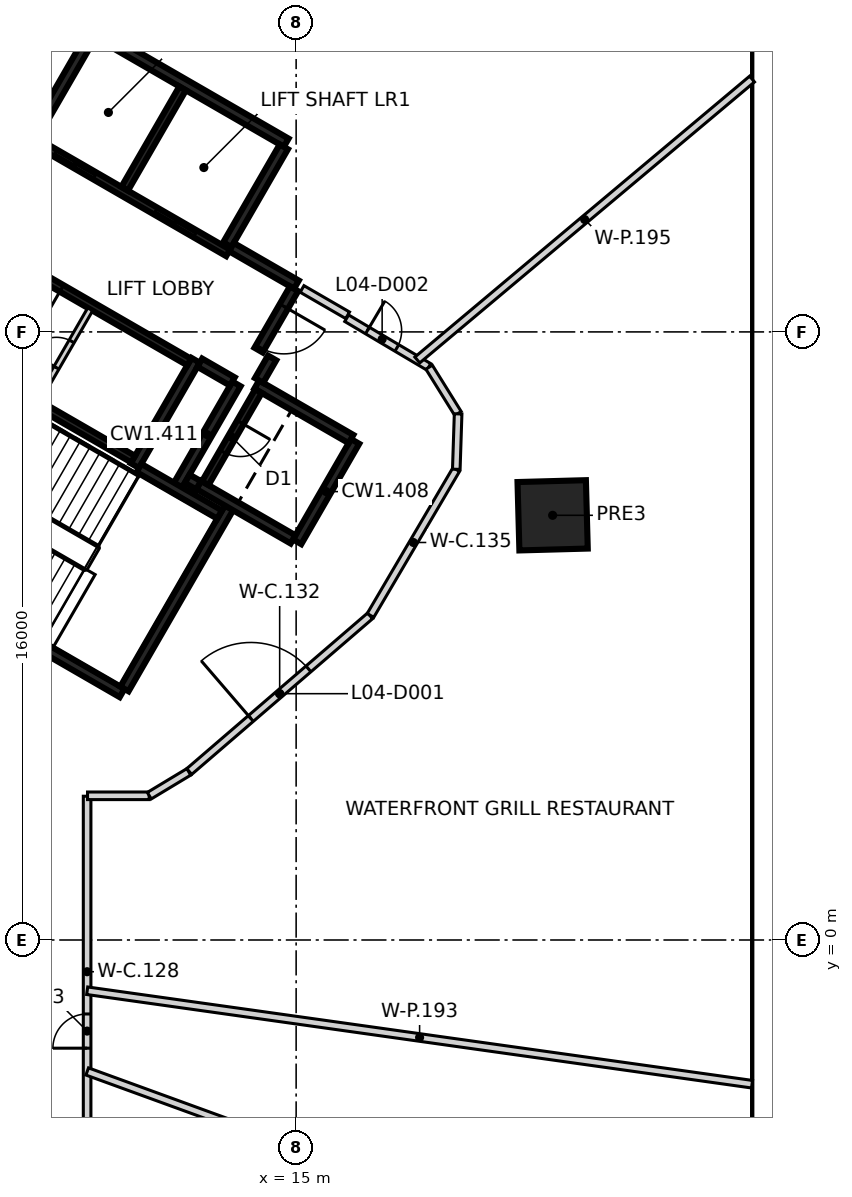
"""IFC4 building model, lengths in metres.
Left out: names, types, materials, properties, quantities, classifications, styles, units other than length and angle.
Written with IfcOpenShell. Run it as: python <this file> out.ifc"""

import sys

from ifc_helpers import new_model, si_unit, direction, frame, frame_2d, origin, origin_2d, place, context, subcontext, project, spatial, rectangle, extrude, element, fill, save


model = new_model("IFC4")
c1 = context("Model", 3, precision=1e-05, world=origin(), true_north=direction((0.0, 1.0)))
c2 = subcontext(c1, "Body", "Model", "MODEL_VIEW")
j1 = project(units=[si_unit("LENGTHUNIT", "METRE"), si_unit("PLANEANGLEUNIT", "RADIAN")], contexts=[c1])
p1 = place(None, origin())
s1 = spatial("IfcSite", under=j1, at=p1, CompositionType="ELEMENT")
p2 = place(p1, origin())
s2 = spatial("IfcBuilding", under=s1, at=p2, CompositionType="ELEMENT")
p3 = place(p2, frame((0.0, 0.0, 24.5)))
s3 = spatial("IfcBuildingStorey", under=s2, at=p3, CompositionType="ELEMENT", Elevation=24.5)
p4 = place(p3, frame((21.749, 11.174, -0.45), z_axis=(0.0, 0.0, 1.0), x_axis=(0.999628128016, 0.02726913418, 0.0)))
e1 = element("IfcColumn", 1, at=p4, inside=s3, PredefinedType="COLUMN", context=c2, shape_type="SweptSolid", body=[
    extrude(rectangle(XDim=1.8, YDim=1.8, at=origin_2d()), origin(), (0.0, 0.0, 1.0), 5.05),
])
p5 = place(p3, frame((10.42, 6.498, 0.0), z_axis=(0.0, 0.0, 1.0), x_axis=(-0.866021906294, 0.500006057782, 0.0)))
e2 = element("IfcWall", 2, at=p5, inside=s3, PredefinedType="SHEAR", context=c2, shape_type="SweptSolid", body=[
    extrude(rectangle(XDim=11.55, YDim=0.25, at=frame_2d((5.775, 0.0))), origin(), (0.0, 0.0, 1.0), 4.6),
])
p6 = place(p5, frame((10.025, 0.0, 0.0)))
e3 = element("IfcOpeningElement", 3, at=p6, cuts=e2, PredefinedType="OPENING", context=c2, shape_type="SweptSolid", body=[
    extrude(rectangle(XDim=1.2, YDim=2.1, at=frame_2d((0.6, 1.05))), frame((0.0, 0.135, 0.0), z_axis=(0.0, -1.0, 0.0), x_axis=(1.0, 0.0, 0.0)), (0.0, 0.0, 1.0), 0.27),
])
p7 = place(p5, frame((8.725, 0.0, 0.0)))
e4 = element("IfcOpeningElement", 4, at=p7, cuts=e2, PredefinedType="OPENING", context=c2, shape_type="SweptSolid", body=[
    extrude(rectangle(XDim=1.2, YDim=2.1, at=frame_2d((0.6, 1.05))), frame((0.0, 0.135, 0.0), z_axis=(0.0, -1.0, 0.0), x_axis=(1.0, 0.0, 0.0)), (0.0, 0.0, 1.0), 0.27),
])
p8 = place(p3, frame((9.673, 23.903, 0.0), z_axis=(0.0, 0.0, 1.0), x_axis=(0.86603616409, -0.499981362141, 0.0)))
e5 = element("IfcWall", 5, at=p8, inside=s3, PredefinedType="SHEAR", context=c2, shape_type="SweptSolid", body=[
    extrude(rectangle(XDim=5.85, YDim=0.25, at=frame_2d((2.925, 0.0))), origin(), (0.0, 0.0, 1.0), 4.6),
])
p9 = place(p3, frame((13.238, 11.378, 0.0), z_axis=(0.0, 0.0, 1.0), x_axis=(-0.500008851346, -0.866020293397, 0.0)))
e6 = element("IfcWall", 6, at=p9, inside=s3, PredefinedType="SHEAR", context=c2, shape_type="SweptSolid", body=[
    extrude(rectangle(XDim=5.51, YDim=0.25, at=frame_2d((2.755, 0.0))), origin(), (0.0, 0.0, 1.0), 4.6),
])
p10 = place(p3, frame((12.357, 15.252, 0.0), z_axis=(0.0, 0.0, 1.0), x_axis=(-0.500028443584, -0.866008981251, 0.0)))
e7 = element("IfcWall", 7, at=p10, inside=s3, PredefinedType="SHEAR", context=c2, shape_type="SweptSolid", body=[
    extrude(rectangle(XDim=3.2, YDim=0.25, at=frame_2d((1.6, 0.0))), origin(), (0.0, 0.0, 1.0), 4.6),
])
for number, where, z_axis, x_axis in (
    (8, (8.123, 21.219, 0.0), (0.0, 0.0, 1.0), (0.5, 0.866, 0.0)),
    (9, (14.676, 20.87, 0.0), (0.0, 0.0, 1.0), (-0.5, -0.866, 0.0)),
):
    element("IfcWall", number, at=place(p3, frame(where, z_axis=z_axis, x_axis=x_axis)), inside=s3, PredefinedType="SHEAR", context=c2, shape_type="SweptSolid", body=[
        extrude(rectangle(XDim=2.975, YDim=0.25, at=frame_2d((1.487, 0.0))), origin(), (0.0, 0.0, 1.0), 4.6),
    ])
p11 = place(p3, frame((16.552, 13.119, 0.0), z_axis=(0.0, 0.0, 1.0), x_axis=(-0.499978833458, -0.866037623948, 0.0)))
e10 = element("IfcWall", 10, at=p11, inside=s3, PredefinedType="SHEAR", context=c2, shape_type="SweptSolid", body=[
    extrude(rectangle(XDim=3.05, YDim=0.25, at=frame_2d((1.525, 0.0))), origin(), (0.0, 0.0, 1.0), 4.6),
])
p12 = place(p3, frame((14.918, 10.54, 0.0), z_axis=(0.0, 0.0, 1.0), x_axis=(-0.866063538972, 0.499933942099, 0.0)))
e11 = element("IfcWall", 11, at=p12, inside=s3, PredefinedType="SHEAR", context=c2, shape_type="SweptSolid", body=[
    extrude(rectangle(XDim=2.865, YDim=0.25, at=frame_2d((1.432, 0.0))), origin(), (0.0, 0.0, 1.0), 4.6),
])
p13 = place(p3, frame((13.963, 14.614, 0.0), z_axis=(0.0, 0.0, 1.0), x_axis=(0.866042235819, -0.499970844928, 0.0)))
e12 = element("IfcWall", 12, at=p13, inside=s3, PredefinedType="SHEAR", context=c2, shape_type="SweptSolid", body=[
    extrude(rectangle(XDim=2.865, YDim=0.25, at=frame_2d((1.432, 0.0))), origin(), (0.0, 0.0, 1.0), 4.6),
])
p14 = place(p3, frame((11.888, 11.961, 0.0), z_axis=(0.0, 0.0, 1.0), x_axis=(0.500003324108, 0.866023484601, 0.0)))
e13 = element("IfcWall", 13, at=p14, inside=s3, PredefinedType="SHEAR", context=c2, shape_type="SweptSolid", body=[
    extrude(rectangle(XDim=3.085, YDim=0.25, at=frame_2d((1.542, 0.0))), origin(), (0.0, 0.0, 1.0), 4.6),
])
p15 = place(p3, frame((10.865, 12.418, 0.0), z_axis=(0.0, 0.0, 1.0), x_axis=(0.866026229868, -0.499998569178, 0.0)))
e14 = element("IfcWall", 14, at=p15, inside=s3, PredefinedType="SHEAR", context=c2, shape_type="SweptSolid", body=[
    extrude(rectangle(XDim=2.449, YDim=0.25, at=frame_2d((1.225, 0.0))), origin(), (0.0, 0.0, 1.0), 4.6),
])
p16 = place(p3, frame((13.297, 18.231, 0.0), z_axis=(0.0, 0.0, 1.0), x_axis=(0.866043531843, -0.499968599967, 0.0)))
e15 = element("IfcWall", 15, at=p16, inside=s3, PredefinedType="SHEAR", context=c2, shape_type="SweptSolid", body=[
    extrude(rectangle(XDim=1.975, YDim=0.25, at=frame_2d((0.987, 0.0))), origin(), (0.0, 0.0, 1.0), 4.6),
])
p17 = place(p3, frame((14.945, 17.135, 0.0), z_axis=(0.0, 0.0, 1.0), x_axis=(-0.499983108224, -0.866035156036, 0.0)))
e16 = element("IfcWall", 16, at=p17, inside=s3, PredefinedType="SHEAR", context=c2, shape_type="SweptSolid", body=[
    extrude(rectangle(XDim=1.865, YDim=0.25, at=frame_2d((0.932, 0.0))), origin(), (0.0, 0.0, 1.0), 4.6),
])
p18 = place(p17, frame((0.535, 0.0, 0.0)))
e17 = element("IfcOpeningElement", 17, at=p18, cuts=e16, PredefinedType="OPENING", context=c2, shape_type="SweptSolid", body=[
    extrude(rectangle(XDim=1.25, YDim=2.1, at=frame_2d((0.625, 1.05))), frame((0.0, 0.135, 0.0), z_axis=(0.0, -1.0, 0.0), x_axis=(1.0, 0.0, 0.0)), (0.0, 0.0, 1.0), 0.27),
])
p19 = place(p3, frame((13.322, 14.695, 0.0), z_axis=(0.0, 0.0, 1.0), x_axis=(-0.866017078145, 0.500014420154, 0.0)))
e18 = element("IfcWall", 18, at=p19, inside=s3, PredefinedType="SHEAR", context=c2, shape_type="SweptSolid", body=[
    extrude(rectangle(XDim=0.989, YDim=0.25, at=frame_2d((0.495, 0.0))), origin(), (0.0, 0.0, 1.0), 4.6),
])
p20 = place(p3, frame((14.368, 15.315, 0.0), z_axis=(0.0, 0.0, 1.0), x_axis=(-0.499897359611, -0.866084655132, 0.0)))
e19 = element("IfcWall", 19, at=p20, inside=s3, PredefinedType="SHEAR", context=c2, shape_type="SweptSolid", body=[
    extrude(rectangle(XDim=0.685, YDim=0.25, at=frame_2d((0.342, 0.0))), origin(), (0.0, 0.0, 1.0), 4.6),
])
p21 = place(p3, frame((12.433, 11.964, 0.0), z_axis=(0.0, 0.0, 1.0), x_axis=(-0.866055875208, 0.499947218231, 0.0)))
e20 = element("IfcWall", 20, at=p21, inside=s3, PredefinedType="SHEAR", context=c2, shape_type="SweptSolid", body=[
    extrude(rectangle(XDim=0.345, YDim=0.25, at=frame_2d((0.172, 0.0))), origin(), (0.0, 0.0, 1.0), 4.6),
])
p22 = place(p3, frame((13.21, 18.08, 0.0), z_axis=(0.0, 0.0, 1.0), x_axis=(-0.866030299012, 0.499991521122, 0.0)))
e21 = element("IfcWall", 21, at=p22, inside=s3, PredefinedType="SHEAR", context=c2, shape_type="SweptSolid", body=[
    extrude(rectangle(XDim=6.1, YDim=0.2, at=frame_2d((3.05, 0.0))), origin(), (0.0, 0.0, 1.0), 4.6),
])
p23 = place(p22, frame((1.0, 0.0, 0.0)))
e22 = element("IfcOpeningElement", 22, at=p23, cuts=e21, PredefinedType="OPENING", context=c2, shape_type="SweptSolid", body=[
    extrude(rectangle(XDim=1.2, YDim=2.1, at=frame_2d((0.6, 1.05))), frame((0.0, 0.11, 0.0), z_axis=(0.0, -1.0, 0.0), x_axis=(1.0, 0.0, 0.0)), (0.0, 0.0, 1.0), 0.22),
])
p24 = place(p22, frame((4.05, 0.0, 0.0)))
e23 = element("IfcOpeningElement", 23, at=p24, cuts=e21, PredefinedType="OPENING", context=c2, shape_type="SweptSolid", body=[
    extrude(rectangle(XDim=1.2, YDim=2.1, at=frame_2d((0.6, 1.05))), frame((0.0, 0.11, 0.0), z_axis=(0.0, -1.0, 0.0), x_axis=(1.0, 0.0, 0.0)), (0.0, 0.0, 1.0), 0.22),
])
p25 = place(p3, frame((5.775, 15.502, 0.0), z_axis=(0.0, 0.0, 1.0), x_axis=(0.866020080793, -0.500009219579, 0.0)))
e24 = element("IfcWall", 24, at=p25, inside=s3, PredefinedType="SHEAR", context=c2, shape_type="SweptSolid", body=[
    extrude(rectangle(XDim=5.699, YDim=0.2, at=frame_2d((2.85, 0.0))), origin(), (0.0, 0.0, 1.0), 4.6),
])
p26 = place(p3, frame((12.185, 15.207, 0.0), z_axis=(0.0, 0.0, 1.0), x_axis=(-0.866020080793, 0.500009219579, 0.0)))
e25 = element("IfcWall", 25, at=p26, inside=s3, PredefinedType="SHEAR", context=c2, shape_type="SweptSolid", body=[
    extrude(rectangle(XDim=5.699, YDim=0.2, at=frame_2d((2.85, 0.0))), origin(), (0.0, 0.0, 1.0), 4.6),
])
p27 = place(p26, frame((3.874, 0.0, 0.0)))
e26 = element("IfcOpeningElement", 26, at=p27, cuts=e25, PredefinedType="OPENING", context=c2, shape_type="SweptSolid", body=[
    extrude(rectangle(XDim=0.9, YDim=2.1, at=frame_2d((0.45, 1.05))), frame((0.0, 0.11, 0.0), z_axis=(0.0, -1.0, 0.0), x_axis=(1.0, 0.0, 0.0)), (0.0, 0.0, 1.0), 0.22),
])
p28 = place(p3, frame((10.489, 19.767, 0.0), z_axis=(0.0, 0.0, 1.0), x_axis=(0.499946628782, 0.866056215479, 0.0)))
e27 = element("IfcWall", 27, at=p28, inside=s3, PredefinedType="SHEAR", context=c2, shape_type="SweptSolid", body=[
    extrude(rectangle(XDim=3.048, YDim=0.2, at=frame_2d((1.524, 0.0))), origin(), (0.0, 0.0, 1.0), 4.6),
])
p29 = place(p3, frame((14.008, 14.442, 0.0), z_axis=(0.0, 0.0, 1.0), x_axis=(-0.499986818241, -0.866033014143, 0.0)))
e28 = element("IfcWall", 28, at=p29, inside=s3, PredefinedType="SHEAR", context=c2, shape_type="SweptSolid", body=[
    extrude(rectangle(XDim=2.798, YDim=0.2, at=frame_2d((1.399, 0.0))), origin(), (0.0, 0.0, 1.0), 4.6),
])
p30 = place(p29, frame((0.949, 0.0, 0.0)))
e29 = element("IfcOpeningElement", 29, at=p30, cuts=e28, PredefinedType="OPENING", context=c2, shape_type="SweptSolid", body=[
    extrude(rectangle(XDim=0.9, YDim=2.1, at=frame_2d((0.45, 1.05))), frame((0.0, 0.11, 0.0), z_axis=(0.0, -1.0, 0.0), x_axis=(1.0, 0.0, 0.0)), (0.0, 0.0, 1.0), 0.22),
])
p31 = place(p3, frame((8.207, 14.214, 0.0), z_axis=(0.0, 0.0, 1.0), x_axis=(0.499922376475, 0.866070215109, 0.0)))
e30 = element("IfcWall", 30, at=p31, inside=s3, PredefinedType="PARTITIONING", context=c2, shape_type="SweptSolid", body=[
    extrude(rectangle(XDim=2.749, YDim=0.15, at=frame_2d((1.374, 0.0))), origin(), (0.0, 0.0, 1.0), 4.6),
])
p32 = place(p31, frame((0.974, 0.0, 0.0)))
e31 = element("IfcOpeningElement", 31, at=p32, cuts=e30, PredefinedType="OPENING", context=c2, shape_type="SweptSolid", body=[
    extrude(rectangle(XDim=0.8, YDim=2.1, at=frame_2d((0.4, 1.05))), frame((0.0, 0.085, 0.0), z_axis=(0.0, -1.0, 0.0), x_axis=(1.0, 0.0, 0.0)), (0.0, 0.0, 1.0), 0.17),
])
p33 = place(p3, frame((9.5, -5.453, 0.0), z_axis=(0.0, 0.0, 1.0), x_axis=(0.0, 1.0, 0.0)))
e32 = element("IfcWall", 32, at=p33, inside=s3, PredefinedType="PARTITIONING", context=c2, shape_type="SweptSolid", body=[
    extrude(rectangle(XDim=9.236, YDim=0.2, at=frame_2d((4.618, 0.0))), origin(), (0.0, 0.0, 1.0), 4.6),
])
p34 = place(p33, frame((2.606, 0.0, 0.0)))
e33 = element("IfcOpeningElement", 33, at=p34, cuts=e32, PredefinedType="OPENING", context=c2, shape_type="SweptSolid", body=[
    extrude(rectangle(XDim=0.9, YDim=2.1, at=frame_2d((0.45, 1.05))), frame((0.0, 0.11, 0.0), z_axis=(0.0, -1.0, 0.0), x_axis=(1.0, 0.0, 0.0)), (0.0, 0.0, 1.0), 0.22),
])
p35 = place(p3, frame((9.511, 3.794, 0.0), z_axis=(0.0, 0.0, 1.0), x_axis=(1.0, 0.0, 0.0)))
e34 = element("IfcWall", 34, at=p35, inside=s3, PredefinedType="PARTITIONING", context=c2, shape_type="SweptSolid", body=[
    extrude(rectangle(XDim=1.622, YDim=0.2, at=frame_2d((0.811, 0.0))), origin(), (0.0, 0.0, 1.0), 4.6),
])
p36 = place(p3, frame((11.136, 3.797, 0.0), z_axis=(0.0, 0.0, 1.0), x_axis=(0.856426766029, 0.516268529381, 0.0)))
e35 = element("IfcWall", 35, at=p36, inside=s3, PredefinedType="PARTITIONING", context=c2, shape_type="SweptSolid", body=[
    extrude(rectangle(XDim=1.214, YDim=0.2, at=frame_2d((0.607, 0.0))), origin(), (0.0, 0.0, 1.0), 4.6),
])
p37 = place(p3, frame((12.187, 4.433, 0.0), z_axis=(0.0, 0.0, 1.0), x_axis=(0.757934867899, 0.652330235405, 0.0)))
e36 = element("IfcWall", 36, at=p37, inside=s3, PredefinedType="PARTITIONING", context=c2, shape_type="SweptSolid", body=[
    extrude(rectangle(XDim=6.279, YDim=0.2, at=frame_2d((3.14, 0.0))), origin(), (0.0, 0.0, 1.0), 4.6),
])
p38 = place(p37, frame((2.139, 0.0, 0.0)))
e37 = element("IfcOpeningElement", 37, at=p38, cuts=e36, PredefinedType="OPENING", context=c2, shape_type="SweptSolid", body=[
    extrude(rectangle(XDim=2.0, YDim=2.1, at=frame_2d((1.0, 1.05))), frame((0.0, 0.11, 0.0), z_axis=(0.0, -1.0, 0.0), x_axis=(1.0, 0.0, 0.0)), (0.0, 0.0, 1.0), 0.22),
])
p39 = place(p3, frame((15.156, 17.131, 0.0), z_axis=(0.0, 0.0, 1.0), x_axis=(0.865639364436, -0.500668044455, 0.0)))
e38 = element("IfcWall", 38, at=p39, inside=s3, PredefinedType="PARTITIONING", context=c2, shape_type="SweptSolid", body=[
    extrude(rectangle(XDim=1.385, YDim=0.2, at=frame_2d((0.693, 0.0))), origin(), (0.0, 0.0, 1.0), 4.6),
])
p40 = place(p3, frame((16.33, 16.36, 0.0), z_axis=(0.0, 0.0, 1.0), x_axis=(0.860403612142, -0.5096132104, 0.0)))
e39 = element("IfcWall", 39, at=p40, inside=s3, PredefinedType="PARTITIONING", context=c2, shape_type="SweptSolid", body=[
    extrude(rectangle(XDim=2.512, YDim=0.2, at=frame_2d((1.256, 0.0))), origin(), (0.0, 0.0, 1.0), 4.6),
])
p41 = place(p40, frame((0.635, 0.0, 0.0)))
e40 = element("IfcOpeningElement", 40, at=p41, cuts=e39, PredefinedType="OPENING", context=c2, shape_type="SweptSolid", body=[
    extrude(rectangle(XDim=0.9, YDim=2.1, at=frame_2d((0.45, 1.05))), frame((0.0, 0.11, 0.0), z_axis=(0.0, -1.0, 0.0), x_axis=(1.0, 0.0, 0.0)), (0.0, 0.0, 1.0), 0.22),
])
p42 = place(p3, frame((16.956, 8.54, 0.0), z_axis=(0.0, 0.0, 1.0), x_axis=(0.506799683615, 0.862063849542, 0.0)))
e41 = element("IfcWall", 41, at=p42, inside=s3, PredefinedType="PARTITIONING", context=c2, shape_type="SweptSolid", body=[
    extrude(rectangle(XDim=4.453, YDim=0.2, at=frame_2d((2.227, 0.0))), origin(), (0.0, 0.0, 1.0), 4.6),
])
p43 = place(p3, frame((18.499, 15.072, 0.0), z_axis=(0.0, 0.0, 1.0), x_axis=(0.528576945796, -0.848885394133, 0.0)))
e42 = element("IfcWall", 42, at=p43, inside=s3, PredefinedType="PARTITIONING", context=c2, shape_type="SweptSolid", body=[
    extrude(rectangle(XDim=1.436, YDim=0.2, at=frame_2d((0.718, 0.0))), origin(), (0.0, 0.0, 1.0), 4.6),
])
p44 = place(p3, frame((19.214, 12.385, 0.0), z_axis=(0.0, 0.0, 1.0), x_axis=(0.032802164331, 0.999461864213, 0.0)))
e43 = element("IfcWall", 43, at=p44, inside=s3, PredefinedType="PARTITIONING", context=c2, shape_type="SweptSolid", body=[
    extrude(rectangle(XDim=1.459, YDim=0.2, at=frame_2d((0.729, 0.0))), origin(), (0.0, 0.0, 1.0), 4.6),
])
p45 = place(p3, frame((7.147, 21.996, 0.0), z_axis=(0.0, 0.0, 1.0), x_axis=(0.309008482175, 0.951059282035, 0.0)))
e44 = element("IfcWall", 44, at=p45, inside=s3, PredefinedType="PARTITIONING", context=c2, shape_type="SweptSolid", body=[
    extrude(rectangle(XDim=17.218, YDim=0.2, at=frame_2d((8.609, 0.0))), origin(), (0.0, 0.0, 1.0), 4.6),
])
p46 = place(p3, frame((9.502, -1.335, 0.0), z_axis=(0.0, 0.0, 1.0), x_axis=(0.990260509173, -0.139226879493, 0.0)))
e45 = element("IfcWall", 45, at=p46, inside=s3, PredefinedType="PARTITIONING", context=c2, shape_type="SweptSolid", body=[
    extrude(rectangle(XDim=17.665, YDim=0.2, at=frame_2d((8.833, 0.0))), origin(), (0.0, 0.0, 1.0), 4.6),
])
p47 = place(p3, frame((9.503, -3.459, 0.0), z_axis=(0.0, 0.0, 1.0), x_axis=(0.939690375329, -0.342026312606, 0.0)))
e46 = element("IfcWall", 46, at=p47, inside=s3, PredefinedType="PARTITIONING", context=c2, shape_type="SweptSolid", body=[
    extrude(rectangle(XDim=18.615, YDim=0.2, at=frame_2d((9.308, 0.0))), origin(), (0.0, 0.0, 1.0), 4.6),
])
p48 = place(p3, frame((18.188, 15.261, 0.0), z_axis=(0.0, 0.0, 1.0), x_axis=(0.766013459385, 0.642824532855, 0.0)))
e47 = element("IfcWall", 47, at=p48, inside=s3, PredefinedType="PARTITIONING", context=c2, shape_type="SweptSolid", body=[
    extrude(rectangle(XDim=11.499, YDim=0.2, at=frame_2d((5.749, 0.0))), origin(), (0.0, 0.0, 1.0), 4.6),
])
p49 = place(p23, origin())
e48 = element("IfcDoor", 48, at=p49, inside=s3, OperationType="DOUBLE_DOOR_SLIDING", PredefinedType="DOOR", context=c2, shape_type="SweptSolid", body=[
    extrude(rectangle(XDim=1.2, YDim=2.1, at=frame_2d((0.6, 1.05))), frame((0.0, 0.025, 0.0), z_axis=(0.0, -1.0, 0.0), x_axis=(1.0, 0.0, 0.0)), (0.0, 0.0, 1.0), 0.05),
])
fill(e22, e48)
p50 = place(p24, origin())
e49 = element("IfcDoor", 49, at=p50, inside=s3, OperationType="DOUBLE_DOOR_SLIDING", PredefinedType="DOOR", context=c2, shape_type="SweptSolid", body=[
    extrude(rectangle(XDim=1.2, YDim=2.1, at=frame_2d((0.6, 1.05))), frame((0.0, 0.025, 0.0), z_axis=(0.0, -1.0, 0.0), x_axis=(1.0, 0.0, 0.0)), (0.0, 0.0, 1.0), 0.05),
])
fill(e23, e49)
p51 = place(p18, origin())
e50 = element("IfcDoor", 50, at=p51, inside=s3, OperationType="SINGLE_SWING_LEFT", PredefinedType="DOOR", context=c2, shape_type="SweptSolid", body=[
    extrude(rectangle(XDim=1.25, YDim=2.1, at=frame_2d((0.625, 1.05))), frame((0.0, 0.025, 0.0), z_axis=(0.0, -1.0, 0.0), x_axis=(1.0, 0.0, 0.0)), (0.0, 0.0, 1.0), 0.05),
])
fill(e17, e50)
p52 = place(p27, origin())
e51 = element("IfcDoor", 51, at=p52, inside=s3, OperationType="SINGLE_SWING_RIGHT", PredefinedType="DOOR", context=c2, shape_type="SweptSolid", body=[
    extrude(rectangle(XDim=0.9, YDim=2.1, at=frame_2d((0.45, 1.05))), frame((0.0, 0.025, 0.0), z_axis=(0.0, -1.0, 0.0), x_axis=(1.0, 0.0, 0.0)), (0.0, 0.0, 1.0), 0.05),
])
fill(e26, e51)
p53 = place(p30, origin())
e52 = element("IfcDoor", 52, at=p53, inside=s3, OperationType="SINGLE_SWING_LEFT", PredefinedType="DOOR", context=c2, shape_type="SweptSolid", body=[
    extrude(rectangle(XDim=0.9, YDim=2.1, at=frame_2d((0.45, 1.05))), frame((0.0, 0.025, 0.0), z_axis=(0.0, -1.0, 0.0), x_axis=(1.0, 0.0, 0.0)), (0.0, 0.0, 1.0), 0.05),
])
fill(e29, e52)
p54 = place(p32, origin())
e53 = element("IfcDoor", 53, at=p54, inside=s3, OperationType="SINGLE_SWING_RIGHT", PredefinedType="DOOR", context=c2, shape_type="SweptSolid", body=[
    extrude(rectangle(XDim=0.8, YDim=2.1, at=frame_2d((0.4, 1.05))), frame((0.0, 0.025, 0.0), z_axis=(0.0, -1.0, 0.0), x_axis=(1.0, 0.0, 0.0)), (0.0, 0.0, 1.0), 0.05),
])
fill(e31, e53)
p55 = place(p38, frame((2.0, 0.0, 0.0), z_axis=(0.0, 0.0, 1.0), x_axis=(-1.0, 0.0, 0.0)))
e54 = element("IfcDoor", 54, at=p55, inside=s3, OperationType="DOUBLE_DOOR_SINGLE_SWING", PredefinedType="DOOR", context=c2, shape_type="SweptSolid", body=[
    extrude(rectangle(XDim=2.0, YDim=2.1, at=frame_2d((1.0, 1.05))), frame((0.0, 0.025, 0.0), z_axis=(0.0, -1.0, 0.0), x_axis=(1.0, 0.0, 0.0)), (0.0, 0.0, 1.0), 0.05),
])
fill(e37, e54)
p56 = place(p41, origin())
e55 = element("IfcDoor", 55, at=p56, inside=s3, OperationType="SINGLE_SWING_LEFT", PredefinedType="DOOR", context=c2, shape_type="SweptSolid", body=[
    extrude(rectangle(XDim=0.9, YDim=2.1, at=frame_2d((0.45, 1.05))), frame((0.0, 0.025, 0.0), z_axis=(0.0, -1.0, 0.0), x_axis=(1.0, 0.0, 0.0)), (0.0, 0.0, 1.0), 0.05),
])
fill(e40, e55)
p57 = place(p34, frame((0.9, 0.0, 0.0), z_axis=(0.0, 0.0, 1.0), x_axis=(-1.0, 0.0, 0.0)))
e56 = element("IfcDoor", 56, at=p57, inside=s3, OperationType="SINGLE_SWING_LEFT", PredefinedType="DOOR", context=c2, shape_type="SweptSolid", body=[
    extrude(rectangle(XDim=0.9, YDim=2.1, at=frame_2d((0.45, 1.05))), frame((0.0, 0.025, 0.0), z_axis=(0.0, -1.0, 0.0), x_axis=(1.0, 0.0, 0.0)), (0.0, 0.0, 1.0), 0.05),
])
fill(e33, e56)
save(model, sys.argv[1])
